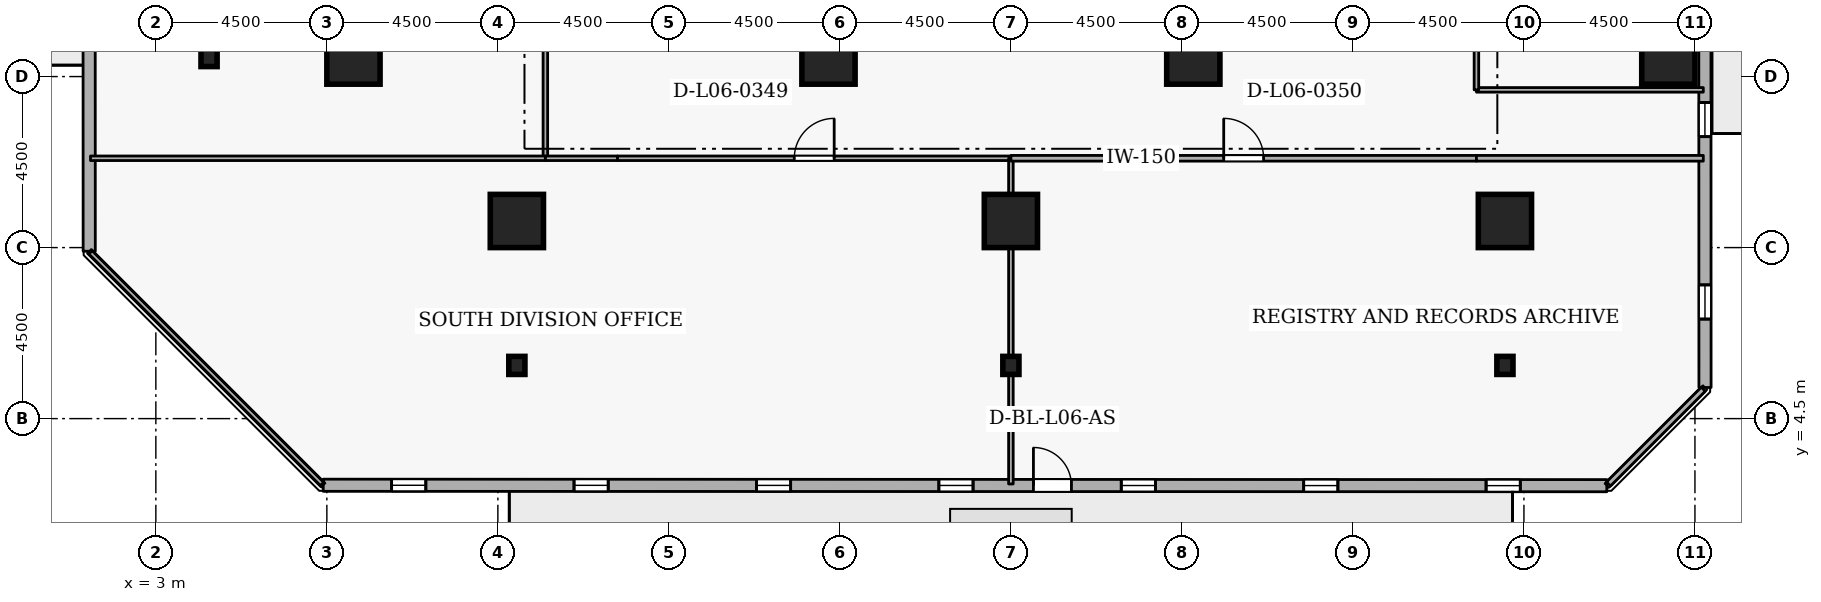
"""IFC4 building model, lengths in metres.
Left out: names, types, materials, properties, quantities, classifications, styles, units other than length and angle.
Written with IfcOpenShell. Run it as: python <this file> out.ifc"""

import sys

from ifc_helpers import new_model, si_unit, direction, frame, frame_2d, origin, origin_2d, place, context, subcontext, project, spatial, rectangle, i_section, extrude, element, fill, save


model = new_model("IFC4")
c1 = context("Model", 3, precision=1e-05, world=origin(), true_north=direction((0.0, 1.0)))
c2 = subcontext(c1, "Body", "Model", "MODEL_VIEW")
j1 = project(units=[si_unit("LENGTHUNIT", "METRE"), si_unit("PLANEANGLEUNIT", "RADIAN")], contexts=[c1])
p1 = place(None, origin())
s1 = spatial("IfcSite", under=j1, at=p1, CompositionType="ELEMENT")
p2 = place(p1, origin())
s2 = spatial("IfcBuilding", under=s1, at=p2, CompositionType="ELEMENT")
p3 = place(p2, frame((0.0, 0.0, 27.9)))
s3 = spatial("IfcBuildingStorey", under=s2, at=p3, CompositionType="ELEMENT", Elevation=27.9)
for number, where, z_axis, x_axis in (
    (1, (12.5, 9.7, 0.0), (0.0, 0.0, 1.0), (1.0, 0.0, 0.0)),
    (2, (25.5, 9.7, 0.0), (0.0, 0.0, 1.0), (1.0, 0.0, 0.0)),
    (3, (38.5, 9.7, 0.0), (0.0, 0.0, 1.0), (1.0, 0.0, 0.0)),
    (4, (42.8, 14.0, 0.0), (0.0, 0.0, 1.0), (1.0, 0.0, 0.0)),
    (5, (8.2, 14.0, 0.0), (0.0, 0.0, 1.0), (1.0, 0.0, 0.0)),
    (6, (20.7, 14.0, 0.0), (0.0, 0.0, 1.0), (1.0, 0.0, 0.0)),
    (7, (30.3, 14.0, 0.0), (0.0, 0.0, 1.0), (1.0, 0.0, 0.0)),
):
    element("IfcColumn", number, at=place(p3, frame(where, z_axis=z_axis, x_axis=x_axis)), inside=s3, PredefinedType="COLUMN", context=c2, shape_type="SweptSolid", body=[
        extrude(rectangle(XDim=1.4, YDim=1.4, at=origin_2d()), origin(), (0.0, 0.0, 1.0), 3.6),
    ])
for number, where, z_axis, x_axis in (
    (8, (12.5, 5.9, 0.0), (0.0, 0.0, 1.0), (1.0, 0.0, 0.0)),
    (9, (25.5, 5.9, 0.0), (0.0, 0.0, 1.0), (1.0, 0.0, 0.0)),
    (10, (38.5, 5.9, 0.0), (0.0, 0.0, 1.0), (1.0, 0.0, 0.0)),
    (11, (4.4, 14.0, 0.0), (0.0, 0.0, 1.0), (1.0, 0.0, 0.0)),
):
    element("IfcColumn", number, at=place(p3, frame(where, z_axis=z_axis, x_axis=x_axis)), inside=s3, PredefinedType="COLUMN", context=c2, shape_type="SweptSolid", body=[
        extrude(i_section(OverallWidth=0.424, OverallDepth=0.475, WebThickness=0.048, FlangeThickness=0.077, FilletRadius=0.015, at=origin_2d()), origin(), (0.0, 0.0, 1.0), 3.6),
    ])
p4 = place(p3, frame((7.404, 2.747, 0.0), z_axis=(0.0, 0.0, 1.0), x_axis=(0.999999942296, -0.000339718087, 0.0)))
e12 = element("IfcWall", 12, at=p4, inside=s3, PredefinedType="STANDARD", context=c2, shape_type="SweptSolid", body=[
    extrude(rectangle(XDim=33.777, YDim=0.32, at=frame_2d((16.888, 0.0))), origin(), (0.0, 0.0, 1.0), 2.7),
])
p5 = place(p4, frame((18.688, 0.0, 0.0)))
e13 = element("IfcOpeningElement", 13, at=p5, cuts=e12, PredefinedType="OPENING", context=c2, shape_type="SweptSolid", body=[
    extrude(rectangle(XDim=1.0, YDim=2.08, at=frame_2d((0.5, 1.04))), frame((0.0, 0.17, 0.0), z_axis=(0.0, -1.0, 0.0), x_axis=(1.0, 0.0, 0.0)), (0.0, 0.0, 1.0), 0.34),
])
p6 = place(p4, frame((1.8, 0.0, 0.72)))
e14 = element("IfcOpeningElement", 14, at=p6, cuts=e12, PredefinedType="OPENING", context=c2, shape_type="SweptSolid", body=[
    extrude(rectangle(XDim=0.9, YDim=1.75, at=frame_2d((0.45, 0.875))), frame((0.0, 0.17, 0.0), z_axis=(0.0, -1.0, 0.0), x_axis=(1.0, 0.0, 0.0)), (0.0, 0.0, 1.0), 0.34),
])
p7 = place(p4, frame((6.6, 0.0, 0.72)))
e15 = element("IfcOpeningElement", 15, at=p7, cuts=e12, PredefinedType="OPENING", context=c2, shape_type="SweptSolid", body=[
    extrude(rectangle(XDim=0.9, YDim=1.75, at=frame_2d((0.45, 0.875))), frame((0.0, 0.17, 0.0), z_axis=(0.0, -1.0, 0.0), x_axis=(1.0, 0.0, 0.0)), (0.0, 0.0, 1.0), 0.34),
])
p8 = place(p4, frame((11.4, 0.0, 0.72)))
e16 = element("IfcOpeningElement", 16, at=p8, cuts=e12, PredefinedType="OPENING", context=c2, shape_type="SweptSolid", body=[
    extrude(rectangle(XDim=0.9, YDim=1.75, at=frame_2d((0.45, 0.875))), frame((0.0, 0.17, 0.0), z_axis=(0.0, -1.0, 0.0), x_axis=(1.0, 0.0, 0.0)), (0.0, 0.0, 1.0), 0.34),
])
p9 = place(p4, frame((16.2, 0.0, 0.72)))
e17 = element("IfcOpeningElement", 17, at=p9, cuts=e12, PredefinedType="OPENING", context=c2, shape_type="SweptSolid", body=[
    extrude(rectangle(XDim=0.9, YDim=1.75, at=frame_2d((0.45, 0.875))), frame((0.0, 0.17, 0.0), z_axis=(0.0, -1.0, 0.0), x_axis=(1.0, 0.0, 0.0)), (0.0, 0.0, 1.0), 0.34),
])
p10 = place(p4, frame((21.0, 0.0, 0.72)))
e18 = element("IfcOpeningElement", 18, at=p10, cuts=e12, PredefinedType="OPENING", context=c2, shape_type="SweptSolid", body=[
    extrude(rectangle(XDim=0.9, YDim=1.75, at=frame_2d((0.45, 0.875))), frame((0.0, 0.17, 0.0), z_axis=(0.0, -1.0, 0.0), x_axis=(1.0, 0.0, 0.0)), (0.0, 0.0, 1.0), 0.34),
])
p11 = place(p4, frame((25.8, 0.0, 0.72)))
e19 = element("IfcOpeningElement", 19, at=p11, cuts=e12, PredefinedType="OPENING", context=c2, shape_type="SweptSolid", body=[
    extrude(rectangle(XDim=0.9, YDim=1.75, at=frame_2d((0.45, 0.875))), frame((0.0, 0.17, 0.0), z_axis=(0.0, -1.0, 0.0), x_axis=(1.0, 0.0, 0.0)), (0.0, 0.0, 1.0), 0.34),
])
p12 = place(p4, frame((30.6, 0.0, 0.72)))
e20 = element("IfcOpeningElement", 20, at=p12, cuts=e12, PredefinedType="OPENING", context=c2, shape_type="SweptSolid", body=[
    extrude(rectangle(XDim=0.9, YDim=1.75, at=frame_2d((0.45, 0.875))), frame((0.0, 0.17, 0.0), z_axis=(0.0, -1.0, 0.0), x_axis=(1.0, 0.0, 0.0)), (0.0, 0.0, 1.0), 0.34),
])
p13 = place(p3, frame((43.765, 5.319, 0.0), z_axis=(0.0, 0.0, 1.0), x_axis=(-0.000339718087, 0.999999942296, 0.0)))
e21 = element("IfcWall", 21, at=p13, inside=s3, PredefinedType="STANDARD", context=c2, shape_type="SweptSolid", body=[
    extrude(rectangle(XDim=33.777, YDim=0.32, at=frame_2d((16.888, 0.0))), origin(), (0.0, 0.0, 1.0), 2.7),
])
p14 = place(p13, frame((18.614, 0.0, 0.0)))
e22 = element("IfcOpeningElement", 22, at=p14, cuts=e21, PredefinedType="OPENING", context=c2, shape_type="SweptSolid", body=[
    extrude(rectangle(XDim=1.15, YDim=2.1, at=frame_2d((0.575, 1.05))), frame((0.0, 0.17, 0.0), z_axis=(0.0, -1.0, 0.0), x_axis=(1.0, 0.0, 0.0)), (0.0, 0.0, 1.0), 0.34),
])
p15 = place(p13, frame((1.8, 0.0, 0.72)))
e23 = element("IfcOpeningElement", 23, at=p15, cuts=e21, PredefinedType="OPENING", context=c2, shape_type="SweptSolid", body=[
    extrude(rectangle(XDim=0.9, YDim=1.75, at=frame_2d((0.45, 0.875))), frame((0.0, 0.17, 0.0), z_axis=(0.0, -1.0, 0.0), x_axis=(1.0, 0.0, 0.0)), (0.0, 0.0, 1.0), 0.34),
])
p16 = place(p13, frame((6.6, 0.0, 0.72)))
e24 = element("IfcOpeningElement", 24, at=p16, cuts=e21, PredefinedType="OPENING", context=c2, shape_type="SweptSolid", body=[
    extrude(rectangle(XDim=0.9, YDim=1.75, at=frame_2d((0.45, 0.875))), frame((0.0, 0.17, 0.0), z_axis=(0.0, -1.0, 0.0), x_axis=(1.0, 0.0, 0.0)), (0.0, 0.0, 1.0), 0.34),
])
p17 = place(p13, frame((11.4, 0.0, 0.72)))
e25 = element("IfcOpeningElement", 25, at=p17, cuts=e21, PredefinedType="OPENING", context=c2, shape_type="SweptSolid", body=[
    extrude(rectangle(XDim=0.9, YDim=1.75, at=frame_2d((0.45, 0.875))), frame((0.0, 0.17, 0.0), z_axis=(0.0, -1.0, 0.0), x_axis=(1.0, 0.0, 0.0)), (0.0, 0.0, 1.0), 0.34),
])
p18 = place(p13, frame((16.2, 0.0, 0.72)))
e26 = element("IfcOpeningElement", 26, at=p18, cuts=e21, PredefinedType="OPENING", context=c2, shape_type="SweptSolid", body=[
    extrude(rectangle(XDim=0.9, YDim=1.75, at=frame_2d((0.45, 0.875))), frame((0.0, 0.17, 0.0), z_axis=(0.0, -1.0, 0.0), x_axis=(1.0, 0.0, 0.0)), (0.0, 0.0, 1.0), 0.34),
])
p19 = place(p13, frame((25.8, 0.0, 0.72)))
e27 = element("IfcOpeningElement", 27, at=p19, cuts=e21, PredefinedType="OPENING", context=c2, shape_type="SweptSolid", body=[
    extrude(rectangle(XDim=0.9, YDim=1.75, at=frame_2d((0.45, 0.875))), frame((0.0, 0.17, 0.0), z_axis=(0.0, -1.0, 0.0), x_axis=(1.0, 0.0, 0.0)), (0.0, 0.0, 1.0), 0.34),
])
p20 = place(p13, frame((30.6, 0.0, 0.72)))
e28 = element("IfcOpeningElement", 28, at=p20, cuts=e21, PredefinedType="OPENING", context=c2, shape_type="SweptSolid", body=[
    extrude(rectangle(XDim=0.9, YDim=1.75, at=frame_2d((0.45, 0.875))), frame((0.0, 0.17, 0.0), z_axis=(0.0, -1.0, 0.0), x_axis=(1.0, 0.0, 0.0)), (0.0, 0.0, 1.0), 0.34),
])
p21 = place(p3, frame((1.235, 42.681, 0.0), z_axis=(0.0, 0.0, 1.0), x_axis=(0.000339718087, -0.999999942296, 0.0)))
e29 = element("IfcWall", 29, at=p21, inside=s3, PredefinedType="STANDARD", context=c2, shape_type="SweptSolid", body=[
    extrude(rectangle(XDim=33.777, YDim=0.32, at=frame_2d((16.888, 0.0))), origin(), (0.0, 0.0, 1.0), 2.7),
])
p22 = place(p21, frame((18.688, 0.0, 0.0)))
e30 = element("IfcOpeningElement", 30, at=p22, cuts=e29, PredefinedType="OPENING", context=c2, shape_type="SweptSolid", body=[
    extrude(rectangle(XDim=1.0, YDim=2.08, at=frame_2d((0.5, 1.04))), frame((0.0, 0.17, 0.0), z_axis=(0.0, -1.0, 0.0), x_axis=(1.0, 0.0, 0.0)), (0.0, 0.0, 1.0), 0.34),
])
p23 = place(p21, frame((1.8, 0.0, 0.72)))
e31 = element("IfcOpeningElement", 31, at=p23, cuts=e29, PredefinedType="OPENING", context=c2, shape_type="SweptSolid", body=[
    extrude(rectangle(XDim=0.9, YDim=1.75, at=frame_2d((0.45, 0.875))), frame((0.0, 0.17, 0.0), z_axis=(0.0, -1.0, 0.0), x_axis=(1.0, 0.0, 0.0)), (0.0, 0.0, 1.0), 0.34),
])
p24 = place(p21, frame((6.6, 0.0, 0.72)))
e32 = element("IfcOpeningElement", 32, at=p24, cuts=e29, PredefinedType="OPENING", context=c2, shape_type="SweptSolid", body=[
    extrude(rectangle(XDim=0.9, YDim=1.75, at=frame_2d((0.45, 0.875))), frame((0.0, 0.17, 0.0), z_axis=(0.0, -1.0, 0.0), x_axis=(1.0, 0.0, 0.0)), (0.0, 0.0, 1.0), 0.34),
])
p25 = place(p21, frame((11.4, 0.0, 0.72)))
e33 = element("IfcOpeningElement", 33, at=p25, cuts=e29, PredefinedType="OPENING", context=c2, shape_type="SweptSolid", body=[
    extrude(rectangle(XDim=0.9, YDim=1.75, at=frame_2d((0.45, 0.875))), frame((0.0, 0.17, 0.0), z_axis=(0.0, -1.0, 0.0), x_axis=(1.0, 0.0, 0.0)), (0.0, 0.0, 1.0), 0.34),
])
p26 = place(p21, frame((16.2, 0.0, 0.72)))
e34 = element("IfcOpeningElement", 34, at=p26, cuts=e29, PredefinedType="OPENING", context=c2, shape_type="SweptSolid", body=[
    extrude(rectangle(XDim=0.9, YDim=1.75, at=frame_2d((0.45, 0.875))), frame((0.0, 0.17, 0.0), z_axis=(0.0, -1.0, 0.0), x_axis=(1.0, 0.0, 0.0)), (0.0, 0.0, 1.0), 0.34),
])
p27 = place(p21, frame((21.0, 0.0, 0.72)))
e35 = element("IfcOpeningElement", 35, at=p27, cuts=e29, PredefinedType="OPENING", context=c2, shape_type="SweptSolid", body=[
    extrude(rectangle(XDim=0.9, YDim=1.75, at=frame_2d((0.45, 0.875))), frame((0.0, 0.17, 0.0), z_axis=(0.0, -1.0, 0.0), x_axis=(1.0, 0.0, 0.0)), (0.0, 0.0, 1.0), 0.34),
])
p28 = place(p21, frame((25.8, 0.0, 0.72)))
e36 = element("IfcOpeningElement", 36, at=p28, cuts=e29, PredefinedType="OPENING", context=c2, shape_type="SweptSolid", body=[
    extrude(rectangle(XDim=0.9, YDim=1.75, at=frame_2d((0.45, 0.875))), frame((0.0, 0.17, 0.0), z_axis=(0.0, -1.0, 0.0), x_axis=(1.0, 0.0, 0.0)), (0.0, 0.0, 1.0), 0.34),
])
p29 = place(p3, frame((13.25, 20.7, 0.0), z_axis=(0.0, 0.0, 1.0), x_axis=(0.0, -1.0, 0.0)))
e37 = element("IfcWall", 37, at=p29, inside=s3, PredefinedType="PARTITIONING", context=c2, shape_type="SweptSolid", body=[
    extrude(rectangle(XDim=9.35, YDim=0.12, at=frame_2d((4.675, 0.0))), origin(), (0.0, 0.0, 1.0), 3.34),
])
p30 = place(p29, frame((4.15, 0.0, 0.0)))
e38 = element("IfcOpeningElement", 38, at=p30, cuts=e37, PredefinedType="OPENING", context=c2, shape_type="SweptSolid", body=[
    extrude(rectangle(XDim=1.05, YDim=2.1, at=frame_2d((0.525, 1.05))), frame((0.0, 0.07, 0.0), z_axis=(0.0, -1.0, 0.0), x_axis=(1.0, 0.0, 0.0)), (0.0, 0.0, 1.0), 0.14),
])
p31 = place(p3, frame((13.25, 11.35, 0.0), z_axis=(0.0, 0.0, 1.0), x_axis=(-1.0, 0.0, 0.0)))
e39 = element("IfcWall", 39, at=p31, inside=s3, PredefinedType="PARTITIONING", context=c2, shape_type="SweptSolid", body=[
    extrude(rectangle(XDim=11.97, YDim=0.12, at=frame_2d((5.985, 0.0))), origin(), (0.0, 0.0, 1.0), 3.34),
])
p32 = place(p3, frame((43.72, 13.15, 0.0), z_axis=(0.0, 0.0, 1.0), x_axis=(-1.0, 0.0, 0.0)))
e40 = element("IfcWall", 40, at=p32, inside=s3, PredefinedType="PARTITIONING", context=c2, shape_type="SweptSolid", body=[
    extrude(rectangle(XDim=5.97, YDim=0.12, at=frame_2d((2.985, 0.0))), origin(), (0.0, 0.0, 1.0), 3.34),
])
p33 = place(p3, frame((37.75, 13.15, 0.0), z_axis=(0.0, 0.0, 1.0), x_axis=(0.0, 1.0, 0.0)))
e41 = element("IfcWall", 41, at=p33, inside=s3, PredefinedType="PARTITIONING", context=c2, shape_type="SweptSolid", body=[
    extrude(rectangle(XDim=1.862, YDim=0.12, at=frame_2d((0.931, 0.0))), origin(), (0.0, 0.0, 1.0), 3.34),
])
p34 = place(p3, frame((7.375, 2.78, 0.0), z_axis=(0.0, 0.0, 1.0), x_axis=(-0.707106781187, 0.707106781187, 0.0)))
e42 = element("IfcWall", 42, at=p34, inside=s3, PredefinedType="PARTITIONING", context=c2, shape_type="SweptSolid", body=[
    extrude(rectangle(XDim=8.619, YDim=0.12, at=frame_2d((4.31, 0.0))), origin(), (0.0, 0.0, 1.0), 3.34),
])
p35 = place(p3, frame((13.25, 11.35, 0.0), z_axis=(0.0, 0.0, 1.0), x_axis=(1.0, 0.0, 0.0)))
e43 = element("IfcWall", 43, at=p35, inside=s3, PredefinedType="PARTITIONING", context=c2, shape_type="SweptSolid", body=[
    extrude(rectangle(XDim=1.9, YDim=0.12, at=frame_2d((0.95, 0.0))), origin(), (0.0, 0.0, 1.0), 3.34),
])
p36 = place(p3, frame((15.15, 11.35, 0.0), z_axis=(0.0, 0.0, 1.0), x_axis=(1.0, 0.0, 0.0)))
e44 = element("IfcWall", 44, at=p36, inside=s3, PredefinedType="PARTITIONING", context=c2, shape_type="SweptSolid", body=[
    extrude(rectangle(XDim=10.35, YDim=0.12, at=frame_2d((5.175, 0.0))), origin(), (0.0, 0.0, 1.0), 3.34),
])
p37 = place(p36, frame((4.65, 0.0, 0.0)))
e45 = element("IfcOpeningElement", 45, at=p37, cuts=e44, PredefinedType="OPENING", context=c2, shape_type="SweptSolid", body=[
    extrude(rectangle(XDim=1.05, YDim=2.1, at=frame_2d((0.525, 1.05))), frame((0.0, 0.07, 0.0), z_axis=(0.0, -1.0, 0.0), x_axis=(1.0, 0.0, 0.0)), (0.0, 0.0, 1.0), 0.14),
])
p38 = place(p3, frame((25.5, 11.35, 0.0), z_axis=(0.0, 0.0, 1.0), x_axis=(0.0, -1.0, 0.0)))
e46 = element("IfcWall", 46, at=p38, inside=s3, PredefinedType="PARTITIONING", context=c2, shape_type="SweptSolid", body=[
    extrude(rectangle(XDim=8.57, YDim=0.12, at=frame_2d((4.285, 0.0))), origin(), (0.0, 0.0, 1.0), 2.878),
])
p39 = place(p3, frame((25.5, 11.35, 0.0), z_axis=(0.0, 0.0, 1.0), x_axis=(1.0, 0.0, 0.0)))
e47 = element("IfcWall", 47, at=p39, inside=s3, PredefinedType="PARTITIONING", context=c2, shape_type="SweptSolid", body=[
    extrude(rectangle(XDim=12.25, YDim=0.15, at=frame_2d((6.125, 0.0))), origin(), (0.0, 0.0, 1.0), 3.34),
])
p40 = place(p39, frame((5.6, 0.0, 0.0)))
e48 = element("IfcOpeningElement", 48, at=p40, cuts=e47, PredefinedType="OPENING", context=c2, shape_type="SweptSolid", body=[
    extrude(rectangle(XDim=1.05, YDim=2.1, at=frame_2d((0.525, 1.05))), frame((0.0, 0.085, 0.0), z_axis=(0.0, -1.0, 0.0), x_axis=(1.0, 0.0, 0.0)), (0.0, 0.0, 1.0), 0.17),
])
p41 = place(p3, frame((37.75, 11.35, 0.0), z_axis=(0.0, 0.0, 1.0), x_axis=(1.0, 0.0, 0.0)))
e49 = element("IfcWall", 49, at=p41, inside=s3, PredefinedType="PARTITIONING", context=c2, shape_type="SweptSolid", body=[
    extrude(rectangle(XDim=5.97, YDim=0.15, at=frame_2d((2.985, 0.0))), origin(), (0.0, 0.0, 1.0), 3.34),
])
p42 = place(p3, frame((43.72, 5.275, 0.0), z_axis=(0.0, 0.0, 1.0), x_axis=(-0.707106781187, -0.707106781187, 0.0)))
e50 = element("IfcWall", 50, at=p42, inside=s3, PredefinedType="PARTITIONING", context=c2, shape_type="SweptSolid", body=[
    extrude(rectangle(XDim=3.528, YDim=0.15, at=frame_2d((1.764, 0.0))), origin(), (0.0, 0.0, 1.0), 3.34),
])
p43 = place(p5, origin())
e51 = element("IfcDoor", 51, at=p43, inside=s3, OperationType="SINGLE_SWING_LEFT", PredefinedType="DOOR", context=c2, shape_type="SweptSolid", body=[
    extrude(rectangle(XDim=1.0, YDim=2.08, at=frame_2d((0.5, 1.04))), frame((0.0, 0.025, 0.0), z_axis=(0.0, -1.0, 0.0), x_axis=(1.0, 0.0, 0.0)), (0.0, 0.0, 1.0), 0.05),
])
fill(e13, e51)
p44 = place(p6, origin())
e52 = element("IfcWindow", 52, at=p44, inside=s3, PartitioningType="SINGLE_PANEL", PredefinedType="WINDOW", context=c2, shape_type="SweptSolid", body=[
    extrude(rectangle(XDim=0.9, YDim=1.75, at=frame_2d((0.45, 0.875))), frame((0.0, 0.03, 0.0), z_axis=(0.0, -1.0, 0.0), x_axis=(1.0, 0.0, 0.0)), (0.0, 0.0, 1.0), 0.06),
])
fill(e14, e52)
p45 = place(p7, origin())
e53 = element("IfcWindow", 53, at=p45, inside=s3, PartitioningType="SINGLE_PANEL", PredefinedType="WINDOW", context=c2, shape_type="SweptSolid", body=[
    extrude(rectangle(XDim=0.9, YDim=1.75, at=frame_2d((0.45, 0.875))), frame((0.0, 0.03, 0.0), z_axis=(0.0, -1.0, 0.0), x_axis=(1.0, 0.0, 0.0)), (0.0, 0.0, 1.0), 0.06),
])
fill(e15, e53)
p46 = place(p8, origin())
e54 = element("IfcWindow", 54, at=p46, inside=s3, PartitioningType="SINGLE_PANEL", PredefinedType="WINDOW", context=c2, shape_type="SweptSolid", body=[
    extrude(rectangle(XDim=0.9, YDim=1.75, at=frame_2d((0.45, 0.875))), frame((0.0, 0.03, 0.0), z_axis=(0.0, -1.0, 0.0), x_axis=(1.0, 0.0, 0.0)), (0.0, 0.0, 1.0), 0.06),
])
fill(e16, e54)
p47 = place(p9, origin())
e55 = element("IfcWindow", 55, at=p47, inside=s3, PartitioningType="SINGLE_PANEL", PredefinedType="WINDOW", context=c2, shape_type="SweptSolid", body=[
    extrude(rectangle(XDim=0.9, YDim=1.75, at=frame_2d((0.45, 0.875))), frame((0.0, 0.03, 0.0), z_axis=(0.0, -1.0, 0.0), x_axis=(1.0, 0.0, 0.0)), (0.0, 0.0, 1.0), 0.06),
])
fill(e17, e55)
p48 = place(p10, origin())
e56 = element("IfcWindow", 56, at=p48, inside=s3, PartitioningType="SINGLE_PANEL", PredefinedType="WINDOW", context=c2, shape_type="SweptSolid", body=[
    extrude(rectangle(XDim=0.9, YDim=1.75, at=frame_2d((0.45, 0.875))), frame((0.0, 0.03, 0.0), z_axis=(0.0, -1.0, 0.0), x_axis=(1.0, 0.0, 0.0)), (0.0, 0.0, 1.0), 0.06),
])
fill(e18, e56)
p49 = place(p11, origin())
e57 = element("IfcWindow", 57, at=p49, inside=s3, PartitioningType="SINGLE_PANEL", PredefinedType="WINDOW", context=c2, shape_type="SweptSolid", body=[
    extrude(rectangle(XDim=0.9, YDim=1.75, at=frame_2d((0.45, 0.875))), frame((0.0, 0.03, 0.0), z_axis=(0.0, -1.0, 0.0), x_axis=(1.0, 0.0, 0.0)), (0.0, 0.0, 1.0), 0.06),
])
fill(e19, e57)
p50 = place(p12, origin())
e58 = element("IfcWindow", 58, at=p50, inside=s3, PartitioningType="SINGLE_PANEL", PredefinedType="WINDOW", context=c2, shape_type="SweptSolid", body=[
    extrude(rectangle(XDim=0.9, YDim=1.75, at=frame_2d((0.45, 0.875))), frame((0.0, 0.03, 0.0), z_axis=(0.0, -1.0, 0.0), x_axis=(1.0, 0.0, 0.0)), (0.0, 0.0, 1.0), 0.06),
])
fill(e20, e58)
p51 = place(p15, origin())
e59 = element("IfcWindow", 59, at=p51, inside=s3, PartitioningType="SINGLE_PANEL", PredefinedType="WINDOW", context=c2, shape_type="SweptSolid", body=[
    extrude(rectangle(XDim=0.9, YDim=1.75, at=frame_2d((0.45, 0.875))), frame((0.0, 0.03, 0.0), z_axis=(0.0, -1.0, 0.0), x_axis=(1.0, 0.0, 0.0)), (0.0, 0.0, 1.0), 0.06),
])
fill(e23, e59)
p52 = place(p16, origin())
e60 = element("IfcWindow", 60, at=p52, inside=s3, PartitioningType="SINGLE_PANEL", PredefinedType="WINDOW", context=c2, shape_type="SweptSolid", body=[
    extrude(rectangle(XDim=0.9, YDim=1.75, at=frame_2d((0.45, 0.875))), frame((0.0, 0.03, 0.0), z_axis=(0.0, -1.0, 0.0), x_axis=(1.0, 0.0, 0.0)), (0.0, 0.0, 1.0), 0.06),
])
fill(e24, e60)
p53 = place(p37, origin())
e61 = element("IfcDoor", 61, at=p53, inside=s3, OperationType="SINGLE_SWING_RIGHT", PredefinedType="DOOR", context=c2, shape_type="SweptSolid", body=[
    extrude(rectangle(XDim=1.05, YDim=2.1, at=frame_2d((0.525, 1.05))), frame((0.0, 0.025, 0.0), z_axis=(0.0, -1.0, 0.0), x_axis=(1.0, 0.0, 0.0)), (0.0, 0.0, 1.0), 0.05),
])
fill(e45, e61)
p54 = place(p40, origin())
e62 = element("IfcDoor", 62, at=p54, inside=s3, OperationType="SINGLE_SWING_LEFT", PredefinedType="DOOR", context=c2, shape_type="SweptSolid", body=[
    extrude(rectangle(XDim=1.05, YDim=2.1, at=frame_2d((0.525, 1.05))), frame((0.0, 0.025, 0.0), z_axis=(0.0, -1.0, 0.0), x_axis=(1.0, 0.0, 0.0)), (0.0, 0.0, 1.0), 0.05),
])
fill(e48, e62)
save(model, sys.argv[1])
